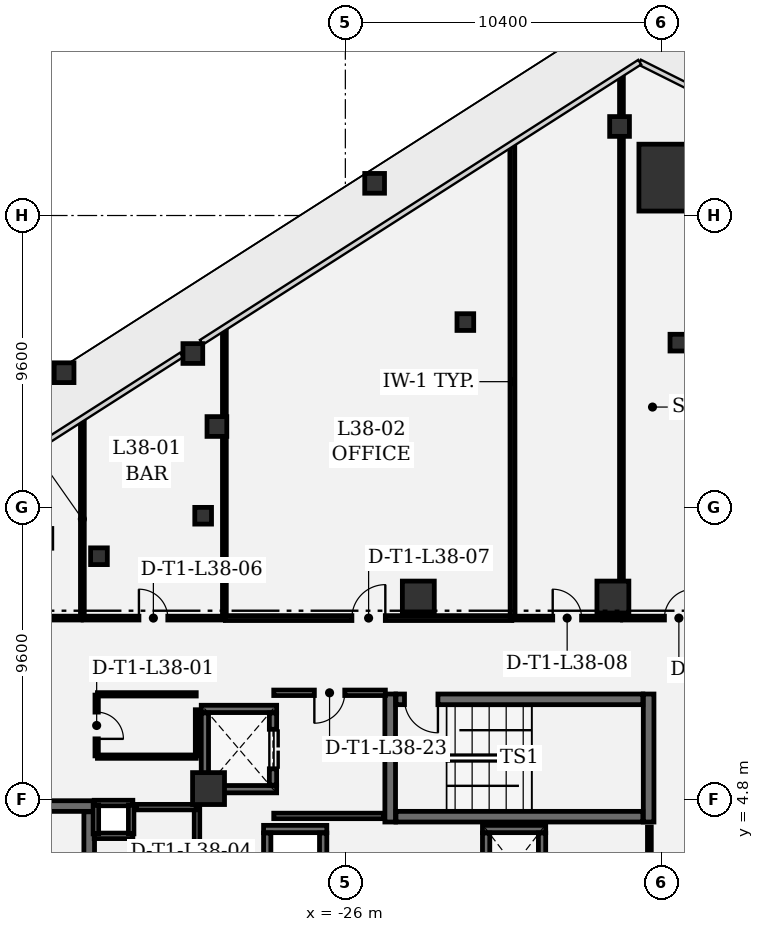
"""IFC4 building model, lengths in metres.
Left out: names, types, materials, properties, quantities, classifications, styles, units other than length and angle.
Written with IfcOpenShell. Run it as: python <this file> out.ifc"""

import sys

from ifc_helpers import new_model, si_unit, direction, frame, frame_2d, origin, origin_2d, place, context, subcontext, project, spatial, rectangle, extrude, element, fill, save


model = new_model("IFC4")
c1 = context("Model", 3, precision=1e-05, world=origin(), true_north=direction((0.0, 1.0)))
c2 = subcontext(c1, "Body", "Model", "MODEL_VIEW")
j1 = project(units=[si_unit("LENGTHUNIT", "METRE"), si_unit("PLANEANGLEUNIT", "RADIAN")], contexts=[c1])
p1 = place(None, origin())
s1 = spatial("IfcSite", under=j1, at=p1, CompositionType="ELEMENT")
p2 = place(p1, origin())
s2 = spatial("IfcBuilding", under=s1, at=p2, CompositionType="ELEMENT")
p3 = place(p2, frame((0.0, 0.0, 166.5)))
s3 = spatial("IfcBuildingStorey", under=s2, at=p3, CompositionType="ELEMENT", Elevation=166.5)
p4 = place(p3, frame((-15.344, 25.246, 0.0), z_axis=(0.0, 0.0, 1.0), x_axis=(1.0, 0.0, 0.0)))
e1 = element("IfcColumn", 1, at=p4, inside=s3, PredefinedType="COLUMN", context=c2, shape_type="SweptSolid", body=[
    extrude(rectangle(XDim=2.0, YDim=2.2, at=origin_2d()), origin(), (0.0, 0.0, 1.0), 4.05),
])
for number, where, z_axis, x_axis in (
    (2, (-23.6, 11.45, 0.0), (0.0, 0.0, 1.0), (1.0, 0.0, 0.0)),
    (3, (-17.2, 11.45, 0.0), (0.0, 0.0, 1.0), (1.0, 0.0, 0.0)),
    (4, (-30.5, 5.15, 0.0), (0.0, 0.0, 1.0), (1.0, 0.0, 0.0)),
):
    element("IfcColumn", number, at=place(p3, frame(where, z_axis=z_axis, x_axis=x_axis)), inside=s3, PredefinedType="COLUMN", context=c2, shape_type="SweptSolid", body=[
        extrude(rectangle(XDim=1.05, YDim=1.05, at=origin_2d()), origin(), (0.0, 0.0, 1.0), 4.05),
    ])
for number, where, z_axis, x_axis in (
    (5, (-35.252, 18.829, 0.0), (0.0, 0.0, 1.0), (1.0, 0.0, 0.0)),
    (6, (-25.038, 25.059, 0.0), (0.0, 0.0, 1.0), (1.0, 0.0, 0.0)),
    (7, (-31.016, 19.46, 0.0), (0.0, 0.0, 1.0), (1.0, 0.0, 0.0)),
    (8, (-16.981, 26.929, 0.0), (0.0, 0.0, 1.0), (1.0, 0.0, 0.0)),
    (9, (-30.225, 17.06, 0.0), (0.0, 0.0, 1.0), (1.0, 0.0, 0.0)),
):
    element("IfcColumn", number, at=place(p3, frame(where, z_axis=z_axis, x_axis=x_axis)), inside=s3, PredefinedType="COLUMN", context=c2, shape_type="SweptSolid", body=[
        extrude(rectangle(XDim=0.65, YDim=0.65, at=origin_2d()), origin(), (0.0, 0.0, 1.0), 4.05),
    ])
for number, where, z_axis, x_axis in (
    (10, (-34.104, 12.792, 0.0), (0.0, 0.0, 1.0), (1.0, 0.0, 0.0)),
    (11, (-22.053, 20.495, 0.0), (0.0, 0.0, 1.0), (1.0, 0.0, 0.0)),
    (12, (-30.677, 14.124, 0.0), (0.0, 0.0, 1.0), (1.0, 0.0, 0.0)),
    (13, (-15.046, 19.818, 0.0), (0.0, 0.0, 1.0), (1.0, 0.0, 0.0)),
):
    element("IfcColumn", number, at=place(p3, frame(where, z_axis=z_axis, x_axis=x_axis)), inside=s3, PredefinedType="COLUMN", context=c2, shape_type="SweptSolid", body=[
        extrude(rectangle(XDim=0.55, YDim=0.55, at=origin_2d()), origin(), (0.0, 0.0, 1.0), 4.05),
    ])
for number, where, z_axis, x_axis in (
    (14, (-24.525, 8.26, 0.0), (0.0, 0.0, 1.0), (0.0, -1.0, 0.0)),
    (15, (-16.025, 4.05, 0.0), (0.0, 0.0, 1.0), (0.0, 1.0, 0.0)),
):
    element("IfcWall", number, at=place(p3, frame(where, z_axis=z_axis, x_axis=x_axis)), inside=s3, PredefinedType="SHEAR", context=c2, shape_type="SweptSolid", body=[
        extrude(rectangle(XDim=4.21, YDim=0.35, at=frame_2d((2.105, 0.0))), origin(), (0.0, 0.0, 1.0), 3.78),
    ])
p5 = place(p3, frame((-24.335, 4.225, 0.0), z_axis=(0.0, 0.0, 1.0), x_axis=(1.0, 0.0, 0.0)))
e16 = element("IfcWall", 16, at=p5, inside=s3, PredefinedType="SHEAR", context=c2, shape_type="SweptSolid", body=[
    extrude(rectangle(XDim=8.12, YDim=0.35, at=frame_2d((4.06, 0.0))), origin(), (0.0, 0.0, 1.0), 3.78),
])
p6 = place(p3, frame((-16.215, 8.085, 0.0), z_axis=(0.0, 0.0, 1.0), x_axis=(-1.0, 0.0, 0.0)))
e17 = element("IfcWall", 17, at=p6, inside=s3, PredefinedType="SHEAR", context=c2, shape_type="SweptSolid", body=[
    extrude(rectangle(XDim=8.12, YDim=0.35, at=frame_2d((4.06, 0.0))), origin(), (0.0, 0.0, 1.0), 3.78),
])
p7 = place(p6, frame((6.74, 0.0, 0.0)))
e18 = element("IfcOpeningElement", 18, at=p7, cuts=e17, PredefinedType="OPENING", context=c2, shape_type="SweptSolid", body=[
    extrude(rectangle(XDim=1.1, YDim=2.2, at=frame_2d((0.55, 1.1))), frame((0.0, 0.185, 0.0), z_axis=(0.0, -1.0, 0.0), x_axis=(1.0, 0.0, 0.0)), (0.0, 0.0, 1.0), 0.37),
])
p8 = place(p3, frame((-34.25, 4.575, 0.0), z_axis=(0.0, 0.0, 1.0), x_axis=(-1.0, 0.0, 0.0)))
e19 = element("IfcWall", 19, at=p8, inside=s3, PredefinedType="SHEAR", context=c2, shape_type="SweptSolid", body=[
    extrude(rectangle(XDim=4.21, YDim=0.35, at=frame_2d((2.105, 0.0))), origin(), (0.0, 0.0, 1.0), 3.78),
])
p9 = place(p3, frame((-34.425, -4.385, 0.0), z_axis=(0.0, 0.0, 1.0), x_axis=(0.0, 1.0, 0.0)))
e20 = element("IfcWall", 20, at=p9, inside=s3, PredefinedType="SHEAR", context=c2, shape_type="SweptSolid", body=[
    extrude(rectangle(XDim=8.77, YDim=0.35, at=frame_2d((4.385, 0.0))), origin(), (0.0, 0.0, 1.0), 3.78),
])
for number, where, z_axis, x_axis in (
    (21, (-28.26, 5.13, 0.0), (0.0, 0.0, 1.0), (-1.0, 0.0, 0.0)),
    (22, (-30.74, 7.77, 0.0), (0.0, 0.0, 1.0), (1.0, 0.0, 0.0)),
):
    element("IfcWall", number, at=place(p3, frame(where, z_axis=z_axis, x_axis=x_axis)), inside=s3, PredefinedType="SHEAR", context=c2, shape_type="SweptSolid", body=[
        extrude(rectangle(XDim=2.48, YDim=0.24, at=frame_2d((1.24, 0.0))), origin(), (0.0, 0.0, 1.0), 3.78),
    ])
p10 = place(p3, frame((-30.62, 5.262, 0.0), z_axis=(0.0, 0.0, 1.0), x_axis=(0.0, 1.0, 0.0)))
e23 = element("IfcWall", 23, at=p10, inside=s3, PredefinedType="SHEAR", context=c2, shape_type="SweptSolid", body=[
    extrude(rectangle(XDim=2.376, YDim=0.24, at=frame_2d((1.188, 0.0))), origin(), (0.0, 0.0, 1.0), 3.78),
])
p11 = place(p3, frame((-28.38, 7.638, 0.0), z_axis=(0.0, 0.0, 1.0), x_axis=(0.0, -1.0, 0.0)))
e24 = element("IfcWall", 24, at=p11, inside=s3, PredefinedType="SHEAR", context=c2, shape_type="SweptSolid", body=[
    extrude(rectangle(XDim=2.376, YDim=0.24, at=frame_2d((1.188, 0.0))), origin(), (0.0, 0.0, 1.0), 3.78),
])
p12 = place(p11, frame((0.538, 0.0, 0.0)))
e25 = element("IfcOpeningElement", 25, at=p12, cuts=e24, PredefinedType="OPENING", context=c2, shape_type="SweptSolid", body=[
    extrude(rectangle(XDim=1.3, YDim=2.3, at=frame_2d((0.65, 1.15))), frame((0.0, 0.13, 0.0), z_axis=(0.0, -1.0, 0.0), x_axis=(1.0, 0.0, 0.0)), (0.0, 0.0, 1.0), 0.26),
])
p13 = place(p3, frame((-28.69, 3.82, 0.0), z_axis=(0.0, 0.0, 1.0), x_axis=(1.0, 0.0, 0.0)))
e26 = element("IfcWall", 26, at=p13, inside=s3, PredefinedType="SHEAR", context=c2, shape_type="SweptSolid", body=[
    extrude(rectangle(XDim=2.08, YDim=0.24, at=frame_2d((1.04, 0.0))), origin(), (0.0, 0.0, 1.0), 3.78),
])
for number, where, z_axis, x_axis in (
    (27, (-28.57, 1.562, 0.0), (0.0, 0.0, 1.0), (0.0, 1.0, 0.0)),
    (28, (-26.73, 3.688, 0.0), (0.0, 0.0, 1.0), (0.0, -1.0, 0.0)),
):
    element("IfcWall", number, at=place(p3, frame(where, z_axis=z_axis, x_axis=x_axis)), inside=s3, PredefinedType="SHEAR", context=c2, shape_type="SweptSolid", body=[
        extrude(rectangle(XDim=2.126, YDim=0.24, at=frame_2d((1.063, 0.0))), origin(), (0.0, 0.0, 1.0), 3.78),
    ])
p14 = place(p3, frame((-21.49, 3.82, 0.0), z_axis=(0.0, 0.0, 1.0), x_axis=(1.0, 0.0, 0.0)))
e29 = element("IfcWall", 29, at=p14, inside=s3, PredefinedType="SHEAR", context=c2, shape_type="SweptSolid", body=[
    extrude(rectangle(XDim=2.08, YDim=0.24, at=frame_2d((1.04, 0.0))), origin(), (0.0, 0.0, 1.0), 3.78),
])
for number, where, z_axis, x_axis in (
    (30, (-21.37, 1.562, 0.0), (0.0, 0.0, 1.0), (0.0, 1.0, 0.0)),
    (31, (-19.53, 3.688, 0.0), (0.0, 0.0, 1.0), (0.0, -1.0, 0.0)),
):
    element("IfcWall", number, at=place(p3, frame(where, z_axis=z_axis, x_axis=x_axis)), inside=s3, PredefinedType="SHEAR", context=c2, shape_type="SweptSolid", body=[
        extrude(rectangle(XDim=2.126, YDim=0.24, at=frame_2d((1.063, 0.0))), origin(), (0.0, 0.0, 1.0), 3.78),
    ])
for number, where, z_axis, x_axis in (
    (32, (-32.99, 3.595, 0.0), (0.0, 0.0, 1.0), (-1.0, 0.0, 0.0)),
    (33, (-34.26, 4.675, 0.0), (0.0, 0.0, 1.0), (1.0, 0.0, 0.0)),
):
    element("IfcWall", number, at=place(p3, frame(where, z_axis=z_axis, x_axis=x_axis)), inside=s3, PredefinedType="PARTITIONING", context=c2, shape_type="SweptSolid", body=[
        extrude(rectangle(XDim=1.27, YDim=0.18, at=frame_2d((0.635, 0.0))), origin(), (0.0, 0.0, 1.0), 3.78),
    ])
for number, where, z_axis, x_axis in (
    (34, (-34.205, 3.66, 0.0), (0.0, 0.0, 1.0), (0.0, 1.0, 0.0)),
    (35, (-33.045, 4.61, 0.0), (0.0, 0.0, 1.0), (0.0, -1.0, 0.0)),
):
    element("IfcWall", number, at=place(p3, frame(where, z_axis=z_axis, x_axis=x_axis)), inside=s3, PredefinedType="PARTITIONING", context=c2, shape_type="SweptSolid", body=[
        extrude(rectangle(XDim=0.95, YDim=0.18, at=frame_2d((0.475, 0.0))), origin(), (0.0, 0.0, 1.0), 3.78),
    ])
p15 = place(p3, frame((-28.355, 4.25, 0.0), z_axis=(0.0, 0.0, 1.0), x_axis=(1.0, 0.0, 0.0)))
e36 = element("IfcWall", 36, at=p15, inside=s3, PredefinedType="PARTITIONING", context=c2, shape_type="SweptSolid", body=[
    extrude(rectangle(XDim=3.622, YDim=0.18, at=frame_2d((1.811, 0.0))), origin(), (0.0, 0.0, 1.0), 3.78),
])
p16 = place(p3, frame((-24.684, 8.3, 0.0), z_axis=(0.0, 0.0, 1.0), x_axis=(-1.0, 0.0, 0.0)))
e37 = element("IfcWall", 37, at=p16, inside=s3, PredefinedType="PARTITIONING", context=c2, shape_type="SweptSolid", body=[
    extrude(rectangle(XDim=3.671, YDim=0.18, at=frame_2d((1.835, 0.0))), origin(), (0.0, 0.0, 1.0), 3.78),
])
p17 = place(p16, frame((1.335, 0.0, 0.0)))
e38 = element("IfcOpeningElement", 38, at=p17, cuts=e37, PredefinedType="OPENING", context=c2, shape_type="SweptSolid", body=[
    extrude(rectangle(XDim=1.0, YDim=2.15, at=frame_2d((0.5, 1.075))), frame((0.0, 0.1, 0.0), z_axis=(0.0, -1.0, 0.0), x_axis=(1.0, 0.0, 0.0)), (0.0, 0.0, 1.0), 0.2),
])
p18 = place(p3, frame((-34.18, 8.225, 0.0), z_axis=(0.0, 0.0, 1.0), x_axis=(0.0, -1.0, 0.0)))
e39 = element("IfcWall", 39, at=p18, inside=s3, PredefinedType="PARTITIONING", context=c2, shape_type="SweptSolid", body=[
    extrude(rectangle(XDim=2.0, YDim=0.11, at=frame_2d((1.0, 0.0))), origin(), (0.0, 0.0, 1.0), 3.78),
])
p19 = place(p18, frame((0.56, 0.0, 0.0)))
e40 = element("IfcOpeningElement", 40, at=p19, cuts=e39, PredefinedType="OPENING", context=c2, shape_type="SweptSolid", body=[
    extrude(rectangle(XDim=0.88, YDim=2.1, at=frame_2d((0.44, 1.05))), frame((0.0, 0.065, 0.0), z_axis=(0.0, -1.0, 0.0), x_axis=(1.0, 0.0, 0.0)), (0.0, 0.0, 1.0), 0.13),
])
p20 = place(p3, frame((-34.155, 6.2, 0.0), z_axis=(0.0, 0.0, 1.0), x_axis=(1.0, 0.0, 0.0)))
e41 = element("IfcWall", 41, at=p20, inside=s3, PredefinedType="PARTITIONING", context=c2, shape_type="SweptSolid", body=[
    extrude(rectangle(XDim=3.25, YDim=0.11, at=frame_2d((1.625, 0.0))), origin(), (0.0, 0.0, 1.0), 3.344),
])
p21 = place(p3, frame((-30.88, 6.225, 0.0), z_axis=(0.0, 0.0, 1.0), x_axis=(0.0, 1.0, 0.0)))
e42 = element("IfcWall", 42, at=p21, inside=s3, PredefinedType="PARTITIONING", context=c2, shape_type="SweptSolid", body=[
    extrude(rectangle(XDim=1.518, YDim=0.11, at=frame_2d((0.759, 0.0))), origin(), (0.0, 0.0, 1.0), 3.78),
])
p22 = place(p3, frame((-30.905, 8.25, 0.0), z_axis=(0.0, 0.0, 1.0), x_axis=(-1.0, 0.0, 0.0)))
e43 = element("IfcWall", 43, at=p22, inside=s3, PredefinedType="PARTITIONING", context=c2, shape_type="SweptSolid", body=[
    extrude(rectangle(XDim=3.25, YDim=0.11, at=frame_2d((1.625, 0.0))), origin(), (0.0, 0.0, 1.0), 3.78),
])
p23 = place(p3, frame((-16.0, 1.585, 0.0), z_axis=(0.0, 0.0, 1.0), x_axis=(0.0, 1.0, 0.0)))
e44 = element("IfcWall", 44, at=p23, inside=s3, PredefinedType="PARTITIONING", context=c2, shape_type="SweptSolid", body=[
    extrude(rectangle(XDim=2.302, YDim=0.125, at=frame_2d((1.151, 0.0))), origin(), (0.0, 0.0, 1.0), 3.78),
])
p24 = place(p3, frame((-30.88, 1.625, 0.0), z_axis=(0.0, 0.0, 1.0), x_axis=(0.0, 1.0, 0.0)))
e45 = element("IfcWall", 45, at=p24, inside=s3, PredefinedType="PARTITIONING", context=c2, shape_type="SweptSolid", body=[
    extrude(rectangle(XDim=2.89, YDim=0.18, at=frame_2d((1.445, 0.0))), origin(), (0.0, 0.0, 1.0), 3.78),
])
p25 = place(p3, frame((-30.905, 4.54, 0.0), z_axis=(0.0, 0.0, 1.0), x_axis=(-1.0, 0.0, 0.0)))
e46 = element("IfcWall", 46, at=p25, inside=s3, PredefinedType="PARTITIONING", context=c2, shape_type="SweptSolid", body=[
    extrude(rectangle(XDim=1.975, YDim=0.18, at=frame_2d((0.988, 0.0))), origin(), (0.0, 0.0, 1.0), 3.78),
])
p26 = place(p3, frame((-34.65, 17.248, 0.0), z_axis=(0.0, 0.0, 1.0), x_axis=(0.0, -1.0, 0.0)))
e47 = element("IfcWall", 47, at=p26, inside=s3, PredefinedType="PARTITIONING", context=c2, shape_type="SweptSolid", body=[
    extrude(rectangle(XDim=6.465, YDim=0.125, at=frame_2d((3.232, 0.0))), origin(), (0.0, 0.0, 1.0), 3.78),
])
p27 = place(p3, frame((-34.625, 10.758, 0.0), z_axis=(0.0, 0.0, 1.0), x_axis=(1.0, 0.0, 0.0)))
e48 = element("IfcWall", 48, at=p27, inside=s3, PredefinedType="PARTITIONING", context=c2, shape_type="SweptSolid", body=[
    extrude(rectangle(XDim=4.621, YDim=0.125, at=frame_2d((2.311, 0.0))), origin(), (0.0, 0.0, 1.0), 3.344),
])
p28 = place(p27, frame((1.835, 0.0, 0.0)))
e49 = element("IfcOpeningElement", 49, at=p28, cuts=e48, PredefinedType="OPENING", context=c2, shape_type="SweptSolid", body=[
    extrude(rectangle(XDim=0.95, YDim=2.15, at=frame_2d((0.475, 1.075))), frame((0.0, 0.073, 0.0), z_axis=(0.0, -1.0, 0.0), x_axis=(1.0, 0.0, 0.0)), (0.0, 0.0, 1.0), 0.145),
])
p29 = place(p3, frame((-29.979, 10.783, 0.0), z_axis=(0.0, 0.0, 1.0), x_axis=(0.0, 1.0, 0.0)))
e50 = element("IfcWall", 50, at=p29, inside=s3, PredefinedType="PARTITIONING", context=c2, shape_type="SweptSolid", body=[
    extrude(rectangle(XDim=5.886, YDim=0.125, at=frame_2d((2.943, 0.0))), origin(), (0.0, 0.0, 1.0), 3.78),
])
p30 = place(p3, frame((-29.979, 17.45, 0.0), z_axis=(0.0, 0.0, 1.0), x_axis=(0.0, 1.0, 0.0)))
e51 = element("IfcWall", 51, at=p30, inside=s3, PredefinedType="PARTITIONING", context=c2, shape_type="SweptSolid", body=[
    extrude(rectangle(XDim=2.783, YDim=0.125, at=frame_2d((1.392, 0.0))), origin(), (0.0, 0.0, 1.0), 3.78),
])
p31 = place(p3, frame((-29.946, 10.758, 0.0), z_axis=(0.0, 0.0, 1.0), x_axis=(1.0, 0.0, 0.0)))
e52 = element("IfcWall", 52, at=p31, inside=s3, PredefinedType="PARTITIONING", context=c2, shape_type="SweptSolid", body=[
    extrude(rectangle(XDim=9.421, YDim=0.16, at=frame_2d((4.711, 0.0))), origin(), (0.0, 0.0, 1.0), 3.78),
])
p32 = place(p31, frame((4.161, 0.0, 0.0)))
e53 = element("IfcOpeningElement", 53, at=p32, cuts=e52, PredefinedType="OPENING", context=c2, shape_type="SweptSolid", body=[
    extrude(rectangle(XDim=1.1, YDim=2.15, at=frame_2d((0.55, 1.075))), frame((0.0, 0.09, 0.0), z_axis=(0.0, -1.0, 0.0), x_axis=(1.0, 0.0, 0.0)), (0.0, 0.0, 1.0), 0.18),
])
p33 = place(p3, frame((-20.499, 10.783, 0.0), z_axis=(0.0, 0.0, 1.0), x_axis=(-0.000582677066, 0.999999830244, 0.0)))
e54 = element("IfcWall", 54, at=p33, inside=s3, PredefinedType="PARTITIONING", context=c2, shape_type="SweptSolid", body=[
    extrude(rectangle(XDim=15.503, YDim=0.16, at=frame_2d((7.751, 0.0))), origin(), (0.0, 0.0, 1.0), 2.895),
])
p34 = place(p3, frame((-20.466, 10.758, 0.0), z_axis=(0.0, 0.0, 1.0), x_axis=(1.0, 0.0, 0.0)))
e55 = element("IfcWall", 55, at=p34, inside=s3, PredefinedType="PARTITIONING", context=c2, shape_type="SweptSolid", body=[
    extrude(rectangle(XDim=3.523, YDim=0.125, at=frame_2d((1.761, 0.0))), origin(), (0.0, 0.0, 1.0), 3.78),
])
p35 = place(p34, frame((1.286, 0.0, 0.0)))
e56 = element("IfcOpeningElement", 56, at=p35, cuts=e55, PredefinedType="OPENING", context=c2, shape_type="SweptSolid", body=[
    extrude(rectangle(XDim=0.95, YDim=2.15, at=frame_2d((0.475, 1.075))), frame((0.0, 0.073, 0.0), z_axis=(0.0, -1.0, 0.0), x_axis=(1.0, 0.0, 0.0)), (0.0, 0.0, 1.0), 0.145),
])
p36 = place(p3, frame((-16.919, 12.04, 0.0), z_axis=(0.0, 0.0, 1.0), x_axis=(0.0, 1.0, 0.0)))
e57 = element("IfcWall", 57, at=p36, inside=s3, PredefinedType="PARTITIONING", context=c2, shape_type="SweptSolid", body=[
    extrude(rectangle(XDim=14.499, YDim=0.125, at=frame_2d((7.25, 0.0))), origin(), (0.0, 0.0, 1.0), 2.895),
])
p37 = place(p3, frame((-16.919, 27.319, 0.0), z_axis=(0.0, 0.0, 1.0), x_axis=(0.0, 1.0, 0.0)))
e58 = element("IfcWall", 58, at=p37, inside=s3, PredefinedType="PARTITIONING", context=c2, shape_type="SweptSolid", body=[
    extrude(rectangle(XDim=1.261, YDim=0.125, at=frame_2d((0.631, 0.0))), origin(), (0.0, 0.0, 1.0), 3.78),
])
p38 = place(p3, frame((-16.885, 10.758, 0.0), z_axis=(0.0, 0.0, 1.0), x_axis=(1.0, 0.0, 0.0)))
e59 = element("IfcWall", 59, at=p38, inside=s3, PredefinedType="PARTITIONING", context=c2, shape_type="SweptSolid", body=[
    extrude(rectangle(XDim=3.711, YDim=0.125, at=frame_2d((1.855, 0.0))), origin(), (0.0, 0.0, 1.0), 2.895),
])
p39 = place(p38, frame((1.38, 0.0, 0.0)))
e60 = element("IfcOpeningElement", 60, at=p39, cuts=e59, PredefinedType="OPENING", context=c2, shape_type="SweptSolid", body=[
    extrude(rectangle(XDim=0.95, YDim=2.15, at=frame_2d((0.475, 1.075))), frame((0.0, 0.073, 0.0), z_axis=(0.0, -1.0, 0.0), x_axis=(1.0, 0.0, 0.0)), (0.0, 0.0, 1.0), 0.145),
])
p40 = place(p3, frame((-34.683, 10.758, 0.0), z_axis=(0.0, 0.0, 1.0), x_axis=(-1.0, 0.0, 0.0)))
e61 = element("IfcWall", 61, at=p40, inside=s3, PredefinedType="PARTITIONING", context=c2, shape_type="SweptSolid", body=[
    extrude(rectangle(XDim=3.15, YDim=0.125, at=frame_2d((1.575, 0.0))), origin(), (0.0, 0.0, 1.0), 3.344),
])
p41 = place(p7, origin())
e62 = element("IfcDoor", 62, at=p41, inside=s3, OperationType="SINGLE_SWING_LEFT", PredefinedType="DOOR", context=c2, shape_type="SweptSolid", body=[
    extrude(rectangle(XDim=1.1, YDim=2.2, at=frame_2d((0.55, 1.1))), frame((0.0, 0.025, 0.0), z_axis=(0.0, -1.0, 0.0), x_axis=(1.0, 0.0, 0.0)), (0.0, 0.0, 1.0), 0.05),
])
fill(e18, e62)
p42 = place(p12, origin())
e63 = element("IfcDoor", 63, at=p42, inside=s3, OperationType="DOUBLE_DOOR_SLIDING", PredefinedType="DOOR", context=c2, shape_type="SweptSolid", body=[
    extrude(rectangle(XDim=1.3, YDim=2.3, at=frame_2d((0.65, 1.15))), frame((0.0, 0.025, 0.0), z_axis=(0.0, -1.0, 0.0), x_axis=(1.0, 0.0, 0.0)), (0.0, 0.0, 1.0), 0.05),
])
fill(e25, e63)
p43 = place(p19, origin())
e64 = element("IfcDoor", 64, at=p43, inside=s3, OperationType="SINGLE_SWING_RIGHT", PredefinedType="DOOR", context=c2, shape_type="SweptSolid", body=[
    extrude(rectangle(XDim=0.88, YDim=2.1, at=frame_2d((0.44, 1.05))), frame((0.0, 0.025, 0.0), z_axis=(0.0, -1.0, 0.0), x_axis=(1.0, 0.0, 0.0)), (0.0, 0.0, 1.0), 0.05),
])
fill(e40, e64)
p44 = place(p28, origin())
e65 = element("IfcDoor", 65, at=p44, inside=s3, OperationType="SINGLE_SWING_LEFT", PredefinedType="DOOR", context=c2, shape_type="SweptSolid", body=[
    extrude(rectangle(XDim=0.95, YDim=2.15, at=frame_2d((0.475, 1.075))), frame((0.0, 0.025, 0.0), z_axis=(0.0, -1.0, 0.0), x_axis=(1.0, 0.0, 0.0)), (0.0, 0.0, 1.0), 0.05),
])
fill(e49, e65)
p45 = place(p32, origin())
e66 = element("IfcDoor", 66, at=p45, inside=s3, OperationType="SINGLE_SWING_RIGHT", PredefinedType="DOOR", context=c2, shape_type="SweptSolid", body=[
    extrude(rectangle(XDim=1.1, YDim=2.15, at=frame_2d((0.55, 1.075))), frame((0.0, 0.025, 0.0), z_axis=(0.0, -1.0, 0.0), x_axis=(1.0, 0.0, 0.0)), (0.0, 0.0, 1.0), 0.05),
])
fill(e53, e66)
p46 = place(p35, origin())
e67 = element("IfcDoor", 67, at=p46, inside=s3, OperationType="SINGLE_SWING_LEFT", PredefinedType="DOOR", context=c2, shape_type="SweptSolid", body=[
    extrude(rectangle(XDim=0.95, YDim=2.15, at=frame_2d((0.475, 1.075))), frame((0.0, 0.025, 0.0), z_axis=(0.0, -1.0, 0.0), x_axis=(1.0, 0.0, 0.0)), (0.0, 0.0, 1.0), 0.05),
])
fill(e56, e67)
p47 = place(p39, origin())
e68 = element("IfcDoor", 68, at=p47, inside=s3, OperationType="SINGLE_SWING_RIGHT", PredefinedType="DOOR", context=c2, shape_type="SweptSolid", body=[
    extrude(rectangle(XDim=0.95, YDim=2.15, at=frame_2d((0.475, 1.075))), frame((0.0, 0.025, 0.0), z_axis=(0.0, -1.0, 0.0), x_axis=(1.0, 0.0, 0.0)), (0.0, 0.0, 1.0), 0.05),
])
fill(e60, e68)
p48 = place(p17, origin())
e69 = element("IfcDoor", 69, at=p48, inside=s3, OperationType="SINGLE_SWING_RIGHT", PredefinedType="DOOR", context=c2, shape_type="SweptSolid", body=[
    extrude(rectangle(XDim=1.0, YDim=2.15, at=frame_2d((0.5, 1.075))), frame((0.0, 0.025, 0.0), z_axis=(0.0, -1.0, 0.0), x_axis=(1.0, 0.0, 0.0)), (0.0, 0.0, 1.0), 0.05),
])
fill(e38, e69)
save(model, sys.argv[1])
